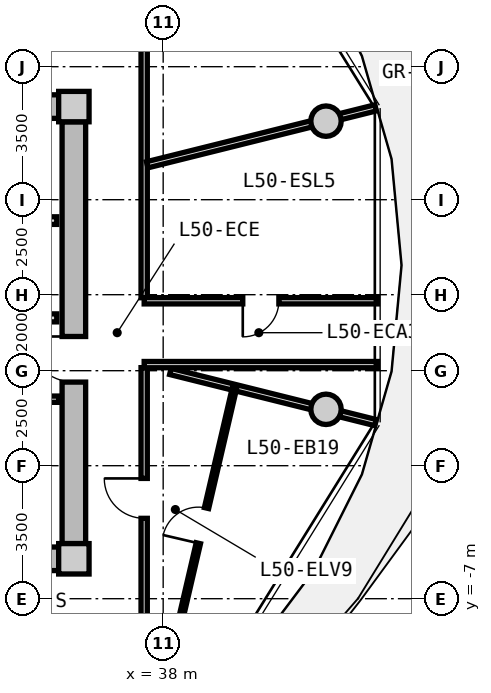
"""IFC4 building model, lengths in metres.
Left out: names, types, materials, properties, quantities, classifications, styles, units other than length and angle.
Written with IfcOpenShell. Run it as: python <this file> out.ifc"""

import sys

from ifc_helpers import new_model, si_unit, direction, frame, frame_2d, origin, origin_2d, place, context, subcontext, project, spatial, rectangle, circle, extrude, source, transform, mapped, element, fill, save


model = new_model("IFC4")
c1 = context("Model", 3, precision=1e-05, world=origin(), true_north=direction((0.0, 1.0)))
c2 = subcontext(c1, "Body", "Model", "MODEL_VIEW")
j1 = project(units=[si_unit("LENGTHUNIT", "METRE"), si_unit("PLANEANGLEUNIT", "RADIAN")], contexts=[c1])
p1 = place(None, origin())
s1 = spatial("IfcSite", under=j1, at=p1, CompositionType="ELEMENT")
p2 = place(p1, origin())
s2 = spatial("IfcBuilding", under=s1, at=p2, CompositionType="ELEMENT")
p3 = place(p2, frame((0.0, 0.0, 161.75)))
s3 = spatial("IfcBuildingStorey", under=s2, at=p3, CompositionType="ELEMENT", Elevation=161.75)
m1 = source(origin(), c2, "Body", "SweptSolid", [
    extrude(rectangle(XDim=0.8, YDim=0.8, at=origin_2d()), origin(), (0.0, 0.0, 1.0), 3.05),
])
for number, where, z_axis, x_axis in (
    (1, (35.65, -5.95, 0.0), (0.0, 0.0, 1.0), (1.0, 0.0, 0.0)),
    (2, (35.65, 5.95, 0.0), (0.0, 0.0, 1.0), (1.0, 0.0, 0.0)),
):
    element("IfcColumn", number, at=place(p3, frame(where, z_axis=z_axis, x_axis=x_axis)), inside=s3, PredefinedType="COLUMN", context=c2, shape_type="MappedRepresentation", body=[
        mapped(m1, transform((0.0, 0.0, 0.0), x_axis=(1.0, 0.0, 0.0), y_axis=(0.0, 1.0, 0.0), z_axis=(0.0, 0.0, 1.0), scale=1.0)),
    ])
m2 = source(origin(), c2, "Body", "SweptSolid", [
    extrude(rectangle(XDim=14.5, YDim=0.62, at=frame_2d((7.25, 0.0))), origin(), (0.0, 0.0, 1.0), 2.81),
])
for number, where, z_axis, x_axis in (
    (3, (20.75, 5.95, 0.0), (0.0, 0.0, 1.0), (1.0, 0.0, 0.0)),
    (4, (35.25, -5.95, 0.0), (0.0, 0.0, 1.0), (-1.0, 0.0, 0.0)),
):
    element("IfcWall", number, at=place(p3, frame(where, z_axis=z_axis, x_axis=x_axis)), inside=s3, PredefinedType="SHEAR", context=c2, shape_type="MappedRepresentation", body=[
        mapped(m2, transform((0.0, 0.0, 0.0), x_axis=(1.0, 0.0, 0.0), y_axis=(0.0, 1.0, 0.0), z_axis=(0.0, 0.0, 1.0), scale=1.0)),
    ])
m3 = source(origin(), c2, "Body", "SweptSolid", [
    extrude(rectangle(XDim=11.1, YDim=0.62, at=frame_2d((5.55, 0.0))), origin(), (0.0, 0.0, 1.0), 2.81),
])
p4 = place(p3, frame((35.65, 5.55, 0.0), z_axis=(0.0, 0.0, 1.0), x_axis=(0.0, -1.0, 0.0)))
e5 = element("IfcWall", 5, at=p4, inside=s3, PredefinedType="SHEAR", context=c2, shape_type="MappedRepresentation", body=[
    mapped(m3, transform((0.0, 0.0, 0.0), x_axis=(1.0, 0.0, 0.0), y_axis=(0.0, 1.0, 0.0), z_axis=(0.0, 0.0, 1.0), scale=1.0)),
])
p5 = place(p4, frame((5.65, 0.0, 0.0)))
e6 = element("IfcOpeningElement", 6, at=p5, cuts=e5, PredefinedType="OPENING", context=c2, shape_type="SweptSolid", body=[
    extrude(rectangle(XDim=1.2, YDim=2.15, at=frame_2d((0.6, 1.075))), frame((0.0, 0.32, 0.0), z_axis=(0.0, -1.0, 0.0), x_axis=(1.0, 0.0, 0.0)), (0.0, 0.0, 1.0), 0.64),
])
m4 = source(origin(), c2, "Body", "SweptSolid", [
    extrude(circle(Radius=0.4, at=origin_2d()), origin(), (0.0, 0.0, 1.0), 3.05),
])
for number, where, z_axis, x_axis in (
    (7, (42.285, 5.567, 0.0), (0.0, 0.0, 1.0), (1.0, 0.0, 0.0)),
    (8, (42.285, -2.016, 0.0), (0.0, 0.0, 1.0), (1.0, 0.0, 0.0)),
):
    element("IfcColumn", number, at=place(p3, frame(where, z_axis=z_axis, x_axis=x_axis)), inside=s3, PredefinedType="COLUMN", context=c2, shape_type="MappedRepresentation", body=[
        mapped(m4, transform((0.0, 0.0, 0.0), x_axis=(1.0, 0.0, 0.0), y_axis=(0.0, 1.0, 0.0), z_axis=(0.0, 0.0, 1.0), scale=1.0)),
    ])
m5 = source(origin(), c2, "Body", "SweptSolid", [
    extrude(rectangle(XDim=3.2, YDim=0.2, at=frame_2d((1.6, 0.0))), origin(), (0.0, 0.0, 1.0), 2.795),
])
p6 = place(p3, frame((32.0, 2.95, 0.0), z_axis=(0.0, 0.0, 1.0), x_axis=(1.0, 0.0, 0.0)))
e9 = element("IfcWall", 9, at=p6, inside=s3, PredefinedType="PARTITIONING", context=c2, shape_type="MappedRepresentation", body=[
    mapped(m5, transform((0.0, 0.0, 0.0), x_axis=(1.0, 0.0, 0.0), y_axis=(0.0, 1.0, 0.0), z_axis=(0.0, 0.0, 1.0), scale=1.0)),
])
m6 = source(origin(), c2, "Body", "SweptSolid", [
    extrude(rectangle(XDim=6.66, YDim=0.21, at=frame_2d((3.33, 0.0))), origin(), (0.0, 0.0, 1.0), 2.795),
])
p7 = place(p3, frame((28.54, 0.39, 0.0), z_axis=(0.0, 0.0, 1.0), x_axis=(1.0, 0.0, 0.0)))
e10 = element("IfcWall", 10, at=p7, inside=s3, PredefinedType="PARTITIONING", context=c2, shape_type="MappedRepresentation", body=[
    mapped(m6, transform((0.0, 0.0, 0.0), x_axis=(1.0, 0.0, 0.0), y_axis=(0.0, 1.0, 0.0), z_axis=(0.0, 0.0, 1.0), scale=1.0)),
])
p8 = place(p7, frame((1.0, 0.0, 0.0)))
e11 = element("IfcOpeningElement", 11, at=p8, cuts=e10, PredefinedType="OPENING", context=c2, shape_type="SweptSolid", body=[
    extrude(rectangle(XDim=1.2, YDim=2.15, at=frame_2d((0.6, 1.075))), frame((0.0, 0.115, 0.0), z_axis=(0.0, -1.0, 0.0), x_axis=(1.0, 0.0, 0.0)), (0.0, 0.0, 1.0), 0.23),
])
m7 = source(origin(), c2, "Body", "SweptSolid", [
    extrude(rectangle(XDim=2.7, YDim=0.165, at=frame_2d((1.35, 0.0))), origin(), (0.0, 0.0, 1.0), 2.795),
])
p9 = place(p3, frame((32.55, -1.75, 0.0), z_axis=(0.0, 0.0, 1.0), x_axis=(1.0, 0.0, 0.0)))
e12 = element("IfcWall", 12, at=p9, inside=s3, PredefinedType="PARTITIONING", context=c2, shape_type="MappedRepresentation", body=[
    mapped(m7, transform((0.0, 0.0, 0.0), x_axis=(1.0, 0.0, 0.0), y_axis=(0.0, 1.0, 0.0), z_axis=(0.0, 0.0, 1.0), scale=1.0)),
])
p10 = place(p9, frame((0.222, 0.0, 0.0)))
e13 = element("IfcOpeningElement", 13, at=p10, cuts=e12, PredefinedType="OPENING", context=c2, shape_type="SweptSolid", body=[
    extrude(rectangle(XDim=0.925, YDim=2.1, at=frame_2d((0.462, 1.05))), frame((0.0, 0.093, 0.0), z_axis=(0.0, -1.0, 0.0), x_axis=(1.0, 0.0, 0.0)), (0.0, 0.0, 1.0), 0.185),
])
p11 = place(p9, frame((1.522, 0.0, 0.0)))
e14 = element("IfcOpeningElement", 14, at=p11, cuts=e12, PredefinedType="OPENING", context=c2, shape_type="SweptSolid", body=[
    extrude(rectangle(XDim=0.925, YDim=2.1, at=frame_2d((0.462, 1.05))), frame((0.0, 0.093, 0.0), z_axis=(0.0, -1.0, 0.0), x_axis=(1.0, 0.0, 0.0)), (0.0, 0.0, 1.0), 0.185),
])
m8 = source(origin(), c2, "Body", "SweptSolid", [
    extrude(rectangle(XDim=6.88, YDim=0.165, at=frame_2d((3.44, 0.0))), origin(), (0.0, 0.0, 1.0), 2.795),
])
p12 = place(p3, frame((37.5, 7.8, 0.0), z_axis=(0.0, 0.0, 1.0), x_axis=(0.0, -1.0, 0.0)))
e15 = element("IfcWall", 15, at=p12, inside=s3, PredefinedType="PARTITIONING", context=c2, shape_type="MappedRepresentation", body=[
    mapped(m8, transform((0.0, 0.0, 0.0), x_axis=(1.0, 0.0, 0.0), y_axis=(0.0, 1.0, 0.0), z_axis=(0.0, 0.0, 1.0), scale=1.0)),
])
p13 = place(p3, frame((37.5, -0.92, 0.0), z_axis=(0.0, 0.0, 1.0), x_axis=(0.0, -1.0, 0.0)))
e16 = element("IfcWall", 16, at=p13, inside=s3, PredefinedType="PARTITIONING", context=c2, shape_type="MappedRepresentation", body=[
    mapped(m8, transform((0.0, 0.0, 0.0), x_axis=(1.0, 0.0, 0.0), y_axis=(0.0, 1.0, 0.0), z_axis=(0.0, 0.0, 1.0), scale=1.0)),
])
p14 = place(p13, frame((2.915, 0.0, 0.0)))
e17 = element("IfcOpeningElement", 17, at=p14, cuts=e16, PredefinedType="OPENING", context=c2, shape_type="SweptSolid", body=[
    extrude(rectangle(XDim=1.05, YDim=2.15, at=frame_2d((0.525, 1.075))), frame((0.0, 0.093, 0.0), z_axis=(0.0, -1.0, 0.0), x_axis=(1.0, 0.0, 0.0)), (0.0, 0.0, 1.0), 0.185),
])
m9 = source(origin(), c2, "Body", "SweptSolid", [
    extrude(rectangle(XDim=5.564, YDim=0.165, at=frame_2d((2.782, 0.0))), origin(), (0.0, 0.0, 1.0), 2.345),
])
p15 = place(p3, frame((38.19, -1.02, 0.0), z_axis=(0.0, 0.0, 1.0), x_axis=(0.97031260977, -0.241854169533, 0.0)))
e18 = element("IfcWall", 18, at=p15, inside=s3, PredefinedType="PARTITIONING", context=c2, shape_type="MappedRepresentation", body=[
    mapped(m9, transform((0.0, 0.0, 0.0), x_axis=(1.0, 0.0, 0.0), y_axis=(0.0, 1.0, 0.0), z_axis=(0.0, 0.0, 1.0), scale=1.0)),
])
m10 = source(origin(), c2, "Body", "SweptSolid", [
    extrude(rectangle(XDim=6.193, YDim=0.165, at=frame_2d((3.096, 0.0))), origin(), (0.0, 0.0, 1.0), 2.345),
])
p16 = place(p3, frame((37.58, 4.419, 0.0), z_axis=(0.0, 0.0, 1.0), x_axis=(0.970309243466, 0.241867674657, 0.0)))
e19 = element("IfcWall", 19, at=p16, inside=s3, PredefinedType="PARTITIONING", context=c2, shape_type="MappedRepresentation", body=[
    mapped(m10, transform((0.0, 0.0, 0.0), x_axis=(1.0, 0.0, 0.0), y_axis=(0.0, 1.0, 0.0), z_axis=(0.0, 0.0, 1.0), scale=1.0)),
])
m11 = source(origin(), c2, "Body", "SweptSolid", [
    extrude(rectangle(XDim=6.139, YDim=0.165, at=frame_2d((3.069, 0.0))), origin(), (0.0, 0.0, 1.0), 2.795),
])
p17 = place(p3, frame((37.5, 0.84, 0.0), z_axis=(0.0, 0.0, 1.0), x_axis=(1.0, 0.0, 0.0)))
e20 = element("IfcWall", 20, at=p17, inside=s3, PredefinedType="PARTITIONING", context=c2, shape_type="MappedRepresentation", body=[
    mapped(m11, transform((0.0, 0.0, 0.0), x_axis=(1.0, 0.0, 0.0), y_axis=(0.0, 1.0, 0.0), z_axis=(0.0, 0.0, 1.0), scale=1.0)),
])
p18 = place(p17, frame((2.594, 0.0, 0.0)))
e21 = element("IfcOpeningElement", 21, at=p18, cuts=e20, PredefinedType="OPENING", context=c2, shape_type="SweptSolid", body=[
    extrude(rectangle(XDim=0.95, YDim=2.1, at=frame_2d((0.475, 1.05))), frame((0.0, 0.093, 0.0), z_axis=(0.0, -1.0, 0.0), x_axis=(1.0, 0.0, 0.0)), (0.0, 0.0, 1.0), 0.185),
])
p19 = place(p3, frame((43.639, -0.84, 0.0), z_axis=(0.0, 0.0, 1.0), x_axis=(-1.0, 0.0, 0.0)))
e22 = element("IfcWall", 22, at=p19, inside=s3, PredefinedType="PARTITIONING", context=c2, shape_type="MappedRepresentation", body=[
    mapped(m11, transform((0.0, 0.0, 0.0), x_axis=(1.0, 0.0, 0.0), y_axis=(0.0, 1.0, 0.0), z_axis=(0.0, 0.0, 1.0), scale=1.0)),
])
m12 = source(origin(), c2, "Body", "SweptSolid", [
    extrude(rectangle(XDim=7.469, YDim=0.115, at=frame_2d((3.734, 0.0))), origin(), (0.0, 0.0, 1.0), 2.795),
])
p20 = place(p3, frame((38.187, -8.715, 0.0), z_axis=(0.0, 0.0, 1.0), x_axis=(0.226790420763, 0.973943584121, 0.0)))
e23 = element("IfcWall", 23, at=p20, inside=s3, PredefinedType="PARTITIONING", context=c2, shape_type="MappedRepresentation", body=[
    mapped(m12, transform((0.0, 0.0, 0.0), x_axis=(1.0, 0.0, 0.0), y_axis=(0.0, 1.0, 0.0), z_axis=(0.0, 0.0, 1.0), scale=1.0)),
])
p21 = place(p20, frame((3.259, 0.0, 0.0)))
e24 = element("IfcOpeningElement", 24, at=p21, cuts=e23, PredefinedType="OPENING", context=c2, shape_type="SweptSolid", body=[
    extrude(rectangle(XDim=0.95, YDim=2.1, at=frame_2d((0.475, 1.05))), frame((0.0, 0.067, 0.0), z_axis=(0.0, -1.0, 0.0), x_axis=(1.0, 0.0, 0.0)), (0.0, 0.0, 1.0), 0.135),
])
m13 = source(origin(), c2, "Body", "SweptSolid", [
    extrude(rectangle(XDim=1.2, YDim=2.15, at=frame_2d((0.6, 1.075))), frame((0.0, 0.025, 0.0), z_axis=(0.0, -1.0, 0.0), x_axis=(1.0, 0.0, 0.0)), (0.0, 0.0, 1.0), 0.05),
])
p22 = place(p5, frame((1.2, 0.0, 0.0), z_axis=(0.0, 0.0, 1.0), x_axis=(-1.0, 0.0, 0.0)))
e25 = element("IfcDoor", 25, at=p22, inside=s3, OperationType="SINGLE_SWING_RIGHT", PredefinedType="DOOR", context=c2, shape_type="MappedRepresentation", body=[
    mapped(m13, transform((0.0, 0.0, 0.0), x_axis=(1.0, 0.0, 0.0), y_axis=(0.0, 1.0, 0.0), z_axis=(0.0, 0.0, 1.0), scale=1.0)),
])
fill(e6, e25)
m14 = source(origin(), c2, "Body", "SweptSolid", [
    extrude(rectangle(XDim=0.95, YDim=2.1, at=frame_2d((0.475, 1.05))), frame((0.0, 0.025, 0.0), z_axis=(0.0, -1.0, 0.0), x_axis=(1.0, 0.0, 0.0)), (0.0, 0.0, 1.0), 0.05),
])
p23 = place(p18, frame((0.95, 0.0, 0.0), z_axis=(0.0, 0.0, 1.0), x_axis=(-1.0, 0.0, 0.0)))
e26 = element("IfcDoor", 26, at=p23, inside=s3, OperationType="SINGLE_SWING_RIGHT", PredefinedType="DOOR", context=c2, shape_type="MappedRepresentation", body=[
    mapped(m14, transform((0.0, 0.0, 0.0), x_axis=(1.0, 0.0, 0.0), y_axis=(0.0, 1.0, 0.0), z_axis=(0.0, 0.0, 1.0), scale=1.0)),
])
fill(e21, e26)
m15 = source(origin(), c2, "Body", "SweptSolid", [
    extrude(rectangle(XDim=1.05, YDim=2.15, at=frame_2d((0.525, 1.075))), frame((0.0, 0.025, 0.0), z_axis=(0.0, -1.0, 0.0), x_axis=(1.0, 0.0, 0.0)), (0.0, 0.0, 1.0), 0.05),
])
p24 = place(p14, frame((1.05, 0.0, 0.0), z_axis=(0.0, 0.0, 1.0), x_axis=(-1.0, 0.0, 0.0)))
e27 = element("IfcDoor", 27, at=p24, inside=s3, OperationType="SINGLE_SWING_RIGHT", PredefinedType="DOOR", context=c2, shape_type="MappedRepresentation", body=[
    mapped(m15, transform((0.0, 0.0, 0.0), x_axis=(1.0, 0.0, 0.0), y_axis=(0.0, 1.0, 0.0), z_axis=(0.0, 0.0, 1.0), scale=1.0)),
])
fill(e17, e27)
p25 = place(p21, origin())
e28 = element("IfcDoor", 28, at=p25, inside=s3, OperationType="SINGLE_SWING_LEFT", PredefinedType="DOOR", context=c2, shape_type="MappedRepresentation", body=[
    mapped(m14, transform((0.0, 0.0, 0.0), x_axis=(1.0, 0.0, 0.0), y_axis=(0.0, 1.0, 0.0), z_axis=(0.0, 0.0, 1.0), scale=1.0)),
])
fill(e24, e28)
save(model, sys.argv[1])
